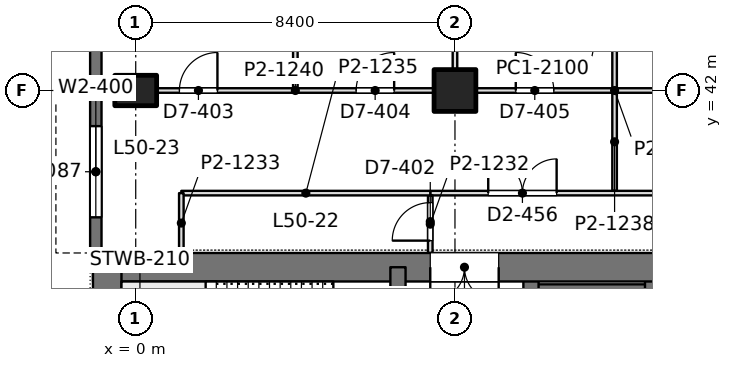
"""IFC4 building model, lengths in metres.
Left out: names, types, materials, properties, quantities, classifications, styles, units other than length and angle.
Written with IfcOpenShell. Run it as: python <this file> out.ifc"""

import sys

from ifc_helpers import new_model, si_unit, direction, frame, frame_2d, origin, origin_2d, place, context, subcontext, project, spatial, rectangle, extrude, element, fill, save


model = new_model("IFC4")
c1 = context("Model", 3, precision=1e-05, world=origin(), true_north=direction((0.0, 1.0)))
c2 = subcontext(c1, "Body", "Model", "MODEL_VIEW")
j1 = project(units=[si_unit("LENGTHUNIT", "METRE"), si_unit("PLANEANGLEUNIT", "RADIAN")], contexts=[c1])
p1 = place(None, origin())
s1 = spatial("IfcSite", under=j1, at=p1, CompositionType="ELEMENT")
p2 = place(p1, origin())
s2 = spatial("IfcBuilding", under=s1, at=p2, CompositionType="ELEMENT")
p3 = place(p2, frame((0.0, 0.0, 219.6)))
s3 = spatial("IfcBuildingStorey", under=s2, at=p3, CompositionType="ELEMENT", Elevation=219.6)
p4 = place(p3, frame((0.0, 42.0, 0.0), z_axis=(0.0, 0.0, 1.0), x_axis=(0.0, 1.0, 0.0)))
e1 = element("IfcColumn", 1, at=p4, inside=s3, PredefinedType="COLUMN", context=c2, shape_type="SweptSolid", body=[
    extrude(rectangle(XDim=0.8, YDim=1.1, at=origin_2d()), origin(), (0.0, 0.0, 1.0), 4.2),
])
p5 = place(p3, frame((8.4, 42.0, 0.0), z_axis=(0.0, 0.0, 1.0), x_axis=(1.0, 0.0, 0.0)))
e2 = element("IfcColumn", 2, at=p5, inside=s3, PredefinedType="COLUMN", context=c2, shape_type="SweptSolid", body=[
    extrude(rectangle(XDim=1.1, YDim=1.1, at=origin_2d()), origin(), (0.0, 0.0, 1.0), 4.2),
])
p6 = place(p3, frame((-1.125, 37.35, 0.0), z_axis=(0.0, 0.0, 1.0), x_axis=(1.0, 0.0, 0.0)))
e3 = element("IfcWall", 3, at=p6, inside=s3, PredefinedType="SHEAR", context=c2, shape_type="SweptSolid", body=[
    extrude(rectangle(XDim=17.85, YDim=0.75, at=frame_2d((8.925, 0.0))), origin(), (0.0, 0.0, 1.0), 4.2),
])
p7 = place(p6, frame((8.875, 0.0, 0.0)))
e4 = element("IfcOpeningElement", 4, at=p7, cuts=e3, PredefinedType="OPENING", context=c2, shape_type="SweptSolid", body=[
    extrude(rectangle(XDim=1.8, YDim=2.4, at=frame_2d((0.9, 1.2))), frame((0.0, 0.385, 0.0), z_axis=(0.0, -1.0, 0.0), x_axis=(1.0, 0.0, 0.0)), (0.0, 0.0, 1.0), 0.77),
])
p8 = place(p3, frame((-0.75, 13.05, 0.0), z_axis=(0.0, 0.0, 1.0), x_axis=(0.0, 1.0, 0.0)))
e5 = element("IfcWall", 5, at=p8, inside=s3, PredefinedType="SHEAR", context=c2, shape_type="SweptSolid", body=[
    extrude(rectangle(XDim=24.3, YDim=0.75, at=frame_2d((12.15, 0.0))), origin(), (0.0, 0.0, 1.0), 4.2),
])
p9 = place(p3, frame((6.9, 13.05, 0.0), z_axis=(0.0, 0.0, 1.0), x_axis=(0.0, 1.0, 0.0)))
e6 = element("IfcWall", 6, at=p9, inside=s3, PredefinedType="SHEAR", context=c2, shape_type="SweptSolid", body=[
    extrude(rectangle(XDim=24.3, YDim=0.4, at=frame_2d((12.15, 0.0))), origin(), (0.0, 0.0, 1.0), 4.2),
])
p10 = place(p9, frame((1.3, 0.0, 0.0)))
e7 = element("IfcOpeningElement", 7, at=p10, cuts=e6, PredefinedType="OPENING", context=c2, shape_type="SweptSolid", body=[
    extrude(rectangle(XDim=1.0, YDim=2.2, at=frame_2d((0.5, 1.1))), frame((0.0, 0.21, 0.0), z_axis=(0.0, -1.0, 0.0), x_axis=(1.0, 0.0, 0.0)), (0.0, 0.0, 1.0), 0.42),
])
p11 = place(p9, frame((22.0, 0.0, 0.0)))
e8 = element("IfcOpeningElement", 8, at=p11, cuts=e6, PredefinedType="OPENING", context=c2, shape_type="SweptSolid", body=[
    extrude(rectangle(XDim=1.0, YDim=2.2, at=frame_2d((0.5, 1.1))), frame((0.0, 0.21, 0.0), z_axis=(0.0, -1.0, 0.0), x_axis=(1.0, 0.0, 0.0)), (0.0, 0.0, 1.0), 0.42),
])
p12 = place(p9, frame((5.55, 0.0, 0.0)))
e9 = element("IfcOpeningElement", 9, at=p12, cuts=e6, PredefinedType="OPENING", context=c2, shape_type="SweptSolid", body=[
    extrude(rectangle(XDim=1.0, YDim=2.2, at=frame_2d((0.5, 1.1))), frame((0.0, 0.21, 0.0), z_axis=(0.0, -1.0, 0.0), x_axis=(1.0, 0.0, 0.0)), (0.0, 0.0, 1.0), 0.42),
])
p13 = place(p9, frame((9.55, 0.0, 0.0)))
e10 = element("IfcOpeningElement", 10, at=p13, cuts=e6, PredefinedType="OPENING", context=c2, shape_type="SweptSolid", body=[
    extrude(rectangle(XDim=1.0, YDim=2.2, at=frame_2d((0.5, 1.1))), frame((0.0, 0.21, 0.0), z_axis=(0.0, -1.0, 0.0), x_axis=(1.0, 0.0, 0.0)), (0.0, 0.0, 1.0), 0.42),
])
p14 = place(p9, frame((12.8, 0.0, 0.0)))
e11 = element("IfcOpeningElement", 11, at=p14, cuts=e6, PredefinedType="OPENING", context=c2, shape_type="SweptSolid", body=[
    extrude(rectangle(XDim=1.1, YDim=2.2, at=frame_2d((0.55, 1.1))), frame((0.0, 0.21, 0.0), z_axis=(0.0, -1.0, 0.0), x_axis=(1.0, 0.0, 0.0)), (0.0, 0.0, 1.0), 0.42),
])
p15 = place(p9, frame((15.538, 0.0, 0.0)))
e12 = element("IfcOpeningElement", 12, at=p15, cuts=e6, PredefinedType="OPENING", context=c2, shape_type="SweptSolid", body=[
    extrude(rectangle(XDim=1.1, YDim=2.2, at=frame_2d((0.55, 1.1))), frame((0.0, 0.21, 0.0), z_axis=(0.0, -1.0, 0.0), x_axis=(1.0, 0.0, 0.0)), (0.0, 0.0, 1.0), 0.42),
])
p16 = place(p9, frame((18.262, 0.0, 0.0)))
e13 = element("IfcOpeningElement", 13, at=p16, cuts=e6, PredefinedType="OPENING", context=c2, shape_type="SweptSolid", body=[
    extrude(rectangle(XDim=1.1, YDim=2.2, at=frame_2d((0.55, 1.1))), frame((0.0, 0.21, 0.0), z_axis=(0.0, -1.0, 0.0), x_axis=(1.0, 0.0, 0.0)), (0.0, 0.0, 1.0), 0.42),
])
p17 = place(p3, frame((10.4, 13.05, 0.0), z_axis=(0.0, 0.0, 1.0), x_axis=(0.0, 1.0, 0.0)))
e14 = element("IfcWall", 14, at=p17, inside=s3, PredefinedType="SHEAR", context=c2, shape_type="SweptSolid", body=[
    extrude(rectangle(XDim=24.3, YDim=0.4, at=frame_2d((12.15, 0.0))), origin(), (0.0, 0.0, 1.0), 4.2),
])
p18 = place(p17, frame((15.75, 0.0, 0.0)))
e15 = element("IfcOpeningElement", 15, at=p18, cuts=e14, PredefinedType="OPENING", context=c2, shape_type="SweptSolid", body=[
    extrude(rectangle(XDim=1.1, YDim=2.2, at=frame_2d((0.55, 1.1))), frame((0.0, 0.21, 0.0), z_axis=(0.0, -1.0, 0.0), x_axis=(1.0, 0.0, 0.0)), (0.0, 0.0, 1.0), 0.42),
])
p19 = place(p17, frame((18.6, 0.0, 0.0)))
e16 = element("IfcOpeningElement", 16, at=p19, cuts=e14, PredefinedType="OPENING", context=c2, shape_type="SweptSolid", body=[
    extrude(rectangle(XDim=1.1, YDim=2.2, at=frame_2d((0.55, 1.1))), frame((0.0, 0.21, 0.0), z_axis=(0.0, -1.0, 0.0), x_axis=(1.0, 0.0, 0.0)), (0.0, 0.0, 1.0), 0.42),
])
p20 = place(p17, frame((21.45, 0.0, 0.0)))
e17 = element("IfcOpeningElement", 17, at=p20, cuts=e14, PredefinedType="OPENING", context=c2, shape_type="SweptSolid", body=[
    extrude(rectangle(XDim=1.1, YDim=2.2, at=frame_2d((0.55, 1.1))), frame((0.0, 0.21, 0.0), z_axis=(0.0, -1.0, 0.0), x_axis=(1.0, 0.0, 0.0)), (0.0, 0.0, 1.0), 0.42),
])
p21 = place(p17, frame((8.65, 0.0, 0.0)))
e18 = element("IfcOpeningElement", 18, at=p21, cuts=e14, PredefinedType="OPENING", context=c2, shape_type="SweptSolid", body=[
    extrude(rectangle(XDim=1.8, YDim=2.4, at=frame_2d((0.9, 1.2))), frame((0.0, 0.21, 0.0), z_axis=(0.0, -1.0, 0.0), x_axis=(1.0, 0.0, 0.0)), (0.0, 0.0, 1.0), 0.42),
])
p22 = place(p3, frame((13.6, 27.925, 0.0), z_axis=(0.0, 0.0, 1.0), x_axis=(0.0, 1.0, 0.0)))
e19 = element("IfcWall", 19, at=p22, inside=s3, PredefinedType="SHEAR", context=c2, shape_type="SweptSolid", body=[
    extrude(rectangle(XDim=9.425, YDim=0.4, at=frame_2d((4.712, 0.0))), origin(), (0.0, 0.0, 1.0), 4.2),
])
p23 = place(p3, frame((10.4, 36.625, 0.0), z_axis=(0.0, 0.0, 1.0), x_axis=(1.0, 0.0, 0.0)))
e20 = element("IfcWall", 20, at=p23, inside=s3, PredefinedType="SHEAR", context=c2, shape_type="SweptSolid", body=[
    extrude(rectangle(XDim=3.2, YDim=0.55, at=frame_2d((1.6, 0.0))), origin(), (0.0, 0.0, 1.0), 4.2),
])
p24 = place(p3, frame((-1.05, 37.725, 0.0), z_axis=(0.0, 0.0, 1.0), x_axis=(0.0, 1.0, 0.0)))
e21 = element("IfcWall", 21, at=p24, inside=s3, PredefinedType="SOLIDWALL", context=c2, shape_type="SweptSolid", body=[
    extrude(rectangle(XDim=4.275, YDim=0.3, at=frame_2d((2.137, 0.0))), origin(), (0.0, 0.0, 1.0), 4.05),
])
p25 = place(p24, frame((0.938, 0.0, 0.9)))
e22 = element("IfcOpeningElement", 22, at=p25, cuts=e21, PredefinedType="OPENING", context=c2, shape_type="SweptSolid", body=[
    extrude(rectangle(XDim=2.4, YDim=1.9, at=frame_2d((1.2, 0.95))), frame((0.0, 0.16, 0.0), z_axis=(0.0, -1.0, 0.0), x_axis=(1.0, 0.0, 0.0)), (0.0, 0.0, 1.0), 0.32),
])
p26 = place(p3, frame((-1.05, 42.0, 0.0), z_axis=(0.0, 0.0, 1.0), x_axis=(0.0, 1.0, 0.0)))
e23 = element("IfcWall", 23, at=p26, inside=s3, PredefinedType="SOLIDWALL", context=c2, shape_type="SweptSolid", body=[
    extrude(rectangle(XDim=2.485, YDim=0.3, at=frame_2d((1.243, 0.0))), origin(), (0.0, 0.0, 1.0), 4.05),
])
p27 = place(p3, frame((0.549, 42.0, 0.0), z_axis=(0.0, 0.0, 1.0), x_axis=(1.0, 0.0, 0.0)))
e24 = element("IfcWall", 24, at=p27, inside=s3, PredefinedType="PARTITIONING", context=c2, shape_type="SweptSolid", body=[
    extrude(rectangle(XDim=7.302, YDim=0.12, at=frame_2d((3.651, 0.0))), origin(), (0.0, 0.0, 1.0), 3.55),
])
p28 = place(p27, frame((0.601, 0.0, 0.0)))
e25 = element("IfcOpeningElement", 25, at=p28, cuts=e24, PredefinedType="OPENING", context=c2, shape_type="SweptSolid", body=[
    extrude(rectangle(XDim=1.0, YDim=2.4, at=frame_2d((0.5, 1.2))), frame((0.0, 0.07, 0.0), z_axis=(0.0, -1.0, 0.0), x_axis=(1.0, 0.0, 0.0)), (0.0, 0.0, 1.0), 0.14),
])
p29 = place(p27, frame((5.251, 0.0, 0.0)))
e26 = element("IfcOpeningElement", 26, at=p29, cuts=e24, PredefinedType="OPENING", context=c2, shape_type="SweptSolid", body=[
    extrude(rectangle(XDim=1.0, YDim=2.4, at=frame_2d((0.5, 1.2))), frame((0.0, 0.07, 0.0), z_axis=(0.0, -1.0, 0.0), x_axis=(1.0, 0.0, 0.0)), (0.0, 0.0, 1.0), 0.14),
])
p30 = place(p3, frame((8.949, 42.0, 0.0), z_axis=(0.0, 0.0, 1.0), x_axis=(1.0, 0.0, 0.0)))
e27 = element("IfcWall", 27, at=p30, inside=s3, PredefinedType="PARTITIONING", context=c2, shape_type="SweptSolid", body=[
    extrude(rectangle(XDim=7.302, YDim=0.12, at=frame_2d((3.651, 0.0))), origin(), (0.0, 0.0, 1.0), 3.55),
])
p31 = place(p30, frame((1.051, 0.0, 0.0)))
e28 = element("IfcOpeningElement", 28, at=p31, cuts=e27, PredefinedType="OPENING", context=c2, shape_type="SweptSolid", body=[
    extrude(rectangle(XDim=1.0, YDim=2.4, at=frame_2d((0.5, 1.2))), frame((0.0, 0.07, 0.0), z_axis=(0.0, -1.0, 0.0), x_axis=(1.0, 0.0, 0.0)), (0.0, 0.0, 1.0), 0.14),
])
p32 = place(p30, frame((5.251, 0.0, 0.0)))
e29 = element("IfcOpeningElement", 29, at=p32, cuts=e27, PredefinedType="OPENING", context=c2, shape_type="SweptSolid", body=[
    extrude(rectangle(XDim=1.0, YDim=2.4, at=frame_2d((0.5, 1.2))), frame((0.0, 0.07, 0.0), z_axis=(0.0, -1.0, 0.0), x_axis=(1.0, 0.0, 0.0)), (0.0, 0.0, 1.0), 0.14),
])
p33 = place(p3, frame((4.2, 42.058, 0.0), z_axis=(0.0, 0.0, 1.0), x_axis=(0.0, 1.0, 0.0)))
e30 = element("IfcWall", 30, at=p33, inside=s3, PredefinedType="PARTITIONING", context=c2, shape_type="SweptSolid", body=[
    extrude(rectangle(XDim=3.644, YDim=0.12, at=frame_2d((1.822, 0.0))), origin(), (0.0, 0.0, 1.0), 3.55),
])
p34 = place(p3, frame((8.4, 42.549, 0.0), z_axis=(0.0, 0.0, 1.0), x_axis=(0.0, 1.0, 0.0)))
e31 = element("IfcWall", 31, at=p34, inside=s3, PredefinedType="PARTITIONING", context=c2, shape_type="SweptSolid", body=[
    extrude(rectangle(XDim=1.702, YDim=0.12, at=frame_2d((0.851, 0.0))), origin(), (0.0, 0.0, 1.0), 3.69),
])
p35 = place(p3, frame((12.6, 42.058, 0.0), z_axis=(0.0, 0.0, 1.0), x_axis=(0.0, 1.0, 0.0)))
e32 = element("IfcWall", 32, at=p35, inside=s3, PredefinedType="PARTITIONING", context=c2, shape_type="SweptSolid", body=[
    extrude(rectangle(XDim=3.644, YDim=0.12, at=frame_2d((1.822, 0.0))), origin(), (0.0, 0.0, 1.0), 3.55),
])
p36 = place(p3, frame((12.6, 39.358, 0.0), z_axis=(0.0, 0.0, 1.0), x_axis=(0.0, 1.0, 0.0)))
e33 = element("IfcWall", 33, at=p36, inside=s3, PredefinedType="PARTITIONING", context=c2, shape_type="SweptSolid", body=[
    extrude(rectangle(XDim=2.584, YDim=0.12, at=frame_2d((1.292, 0.0))), origin(), (0.0, 0.0, 1.0), 3.55),
])
p37 = place(p3, frame((7.748, 39.3, 0.0), z_axis=(0.0, 0.0, 1.0), x_axis=(1.0, 0.0, 0.0)))
e34 = element("IfcWall", 34, at=p37, inside=s3, PredefinedType="PARTITIONING", context=c2, shape_type="SweptSolid", body=[
    extrude(rectangle(XDim=41.452, YDim=0.12, at=frame_2d((20.726, 0.0))), origin(), (0.0, 0.0, 1.0), 3.55),
])
p38 = place(p37, frame((1.527, 0.0, 0.0)))
e35 = element("IfcOpeningElement", 35, at=p38, cuts=e34, PredefinedType="OPENING", context=c2, shape_type="SweptSolid", body=[
    extrude(rectangle(XDim=1.8, YDim=2.2, at=frame_2d((0.9, 1.1))), frame((0.0, 0.07, 0.0), z_axis=(0.0, -1.0, 0.0), x_axis=(1.0, 0.0, 0.0)), (0.0, 0.0, 1.0), 0.14),
])
p39 = place(p37, frame((8.152, 0.0, 0.0)))
e36 = element("IfcOpeningElement", 36, at=p39, cuts=e34, PredefinedType="OPENING", context=c2, shape_type="SweptSolid", body=[
    extrude(rectangle(XDim=1.8, YDim=2.2, at=frame_2d((0.9, 1.1))), frame((0.0, 0.07, 0.0), z_axis=(0.0, -1.0, 0.0), x_axis=(1.0, 0.0, 0.0)), (0.0, 0.0, 1.0), 0.14),
])
p40 = place(p37, frame((12.352, 0.0, 0.0)))
e37 = element("IfcOpeningElement", 37, at=p40, cuts=e34, PredefinedType="OPENING", context=c2, shape_type="SweptSolid", body=[
    extrude(rectangle(XDim=1.8, YDim=2.2, at=frame_2d((0.9, 1.1))), frame((0.0, 0.07, 0.0), z_axis=(0.0, -1.0, 0.0), x_axis=(1.0, 0.0, 0.0)), (0.0, 0.0, 1.0), 0.14),
])
p41 = place(p37, frame((20.752, 0.0, 0.0)))
e38 = element("IfcOpeningElement", 38, at=p41, cuts=e34, PredefinedType="OPENING", context=c2, shape_type="SweptSolid", body=[
    extrude(rectangle(XDim=1.8, YDim=2.2, at=frame_2d((0.9, 1.1))), frame((0.0, 0.07, 0.0), z_axis=(0.0, -1.0, 0.0), x_axis=(1.0, 0.0, 0.0)), (0.0, 0.0, 1.0), 0.14),
])
p42 = place(p37, frame((24.952, 0.0, 0.0)))
e39 = element("IfcOpeningElement", 39, at=p42, cuts=e34, PredefinedType="OPENING", context=c2, shape_type="SweptSolid", body=[
    extrude(rectangle(XDim=1.8, YDim=2.2, at=frame_2d((0.9, 1.1))), frame((0.0, 0.07, 0.0), z_axis=(0.0, -1.0, 0.0), x_axis=(1.0, 0.0, 0.0)), (0.0, 0.0, 1.0), 0.14),
])
p43 = place(p37, frame((32.952, 0.0, 0.0)))
e40 = element("IfcOpeningElement", 40, at=p43, cuts=e34, PredefinedType="OPENING", context=c2, shape_type="SweptSolid", body=[
    extrude(rectangle(XDim=1.8, YDim=2.2, at=frame_2d((0.9, 1.1))), frame((0.0, 0.07, 0.0), z_axis=(0.0, -1.0, 0.0), x_axis=(1.0, 0.0, 0.0)), (0.0, 0.0, 1.0), 0.14),
])
p44 = place(p37, frame((36.752, 0.0, 0.0)))
e41 = element("IfcOpeningElement", 41, at=p44, cuts=e34, PredefinedType="OPENING", context=c2, shape_type="SweptSolid", body=[
    extrude(rectangle(XDim=1.8, YDim=2.2, at=frame_2d((0.9, 1.1))), frame((0.0, 0.07, 0.0), z_axis=(0.0, -1.0, 0.0), x_axis=(1.0, 0.0, 0.0)), (0.0, 0.0, 1.0), 0.14),
])
p45 = place(p3, frame((7.75, 37.724, 0.0), z_axis=(0.0, 0.0, 1.0), x_axis=(0.0, 1.0, 0.0)))
e42 = element("IfcWall", 42, at=p45, inside=s3, PredefinedType="PARTITIONING", context=c2, shape_type="SweptSolid", body=[
    extrude(rectangle(XDim=1.518, YDim=0.12, at=frame_2d((0.759, 0.0))), origin(), (0.0, 0.0, 1.0), 4.05),
])
p46 = place(p45, frame((0.326, 0.0, 0.0)))
e43 = element("IfcOpeningElement", 43, at=p46, cuts=e42, PredefinedType="OPENING", context=c2, shape_type="SweptSolid", body=[
    extrude(rectangle(XDim=1.0, YDim=2.4, at=frame_2d((0.5, 1.2))), frame((0.0, 0.07, 0.0), z_axis=(0.0, -1.0, 0.0), x_axis=(1.0, 0.0, 0.0)), (0.0, 0.0, 1.0), 0.14),
])
p47 = place(p3, frame((1.2, 39.3, 0.0), z_axis=(0.0, 0.0, 1.0), x_axis=(1.0, 0.0, 0.0)))
e44 = element("IfcWall", 44, at=p47, inside=s3, PredefinedType="PARTITIONING", context=c2, shape_type="SweptSolid", body=[
    extrude(rectangle(XDim=6.552, YDim=0.12, at=frame_2d((3.276, 0.0))), origin(), (0.0, 0.0, 1.0), 3.69),
])
p48 = place(p3, frame((1.2, 37.724, 0.0), z_axis=(0.0, 0.0, 1.0), x_axis=(0.0, 1.0, 0.0)))
e45 = element("IfcWall", 45, at=p48, inside=s3, PredefinedType="PARTITIONING", context=c2, shape_type="SweptSolid", body=[
    extrude(rectangle(XDim=1.576, YDim=0.12, at=frame_2d((0.788, 0.0))), origin(), (0.0, 0.0, 1.0), 4.05),
])
p49 = place(p25, origin())
e46 = element("IfcWindow", 46, at=p49, inside=s3, PartitioningType="SINGLE_PANEL", PredefinedType="WINDOW", context=c2, shape_type="SweptSolid", body=[
    extrude(rectangle(XDim=2.4, YDim=1.9, at=frame_2d((1.2, 0.95))), frame((0.0, 0.03, 0.0), z_axis=(0.0, -1.0, 0.0), x_axis=(1.0, 0.0, 0.0)), (0.0, 0.0, 1.0), 0.06),
])
fill(e22, e46)
p50 = place(p7, frame((1.8, 0.0, 0.0), z_axis=(0.0, 0.0, 1.0), x_axis=(-1.0, 0.0, 0.0)))
e47 = element("IfcDoor", 47, at=p50, inside=s3, OperationType="DOUBLE_DOOR_SINGLE_SWING", PredefinedType="DOOR", context=c2, shape_type="SweptSolid", body=[
    extrude(rectangle(XDim=1.8, YDim=2.4, at=frame_2d((0.9, 1.2))), frame((0.0, 0.025, 0.0), z_axis=(0.0, -1.0, 0.0), x_axis=(1.0, 0.0, 0.0)), (0.0, 0.0, 1.0), 0.05),
])
fill(e4, e47)
p51 = place(p28, origin())
e48 = element("IfcDoor", 48, at=p51, inside=s3, OperationType="SINGLE_SWING_RIGHT", PredefinedType="DOOR", context=c2, shape_type="SweptSolid", body=[
    extrude(rectangle(XDim=1.0, YDim=2.4, at=frame_2d((0.5, 1.2))), frame((0.0, 0.025, 0.0), z_axis=(0.0, -1.0, 0.0), x_axis=(1.0, 0.0, 0.0)), (0.0, 0.0, 1.0), 0.05),
])
fill(e25, e48)
p52 = place(p29, origin())
e49 = element("IfcDoor", 49, at=p52, inside=s3, OperationType="SINGLE_SWING_RIGHT", PredefinedType="DOOR", context=c2, shape_type="SweptSolid", body=[
    extrude(rectangle(XDim=1.0, YDim=2.4, at=frame_2d((0.5, 1.2))), frame((0.0, 0.025, 0.0), z_axis=(0.0, -1.0, 0.0), x_axis=(1.0, 0.0, 0.0)), (0.0, 0.0, 1.0), 0.05),
])
fill(e26, e49)
p53 = place(p31, origin())
e50 = element("IfcDoor", 50, at=p53, inside=s3, OperationType="SINGLE_SWING_LEFT", PredefinedType="DOOR", context=c2, shape_type="SweptSolid", body=[
    extrude(rectangle(XDim=1.0, YDim=2.4, at=frame_2d((0.5, 1.2))), frame((0.0, 0.025, 0.0), z_axis=(0.0, -1.0, 0.0), x_axis=(1.0, 0.0, 0.0)), (0.0, 0.0, 1.0), 0.05),
])
fill(e28, e50)
p54 = place(p38, origin())
e51 = element("IfcDoor", 51, at=p54, inside=s3, OperationType="DOUBLE_DOOR_SINGLE_SWING", PredefinedType="DOOR", context=c2, shape_type="SweptSolid", body=[
    extrude(rectangle(XDim=1.8, YDim=2.2, at=frame_2d((0.9, 1.1))), frame((0.0, 0.025, 0.0), z_axis=(0.0, -1.0, 0.0), x_axis=(1.0, 0.0, 0.0)), (0.0, 0.0, 1.0), 0.05),
])
fill(e35, e51)
p55 = place(p46, origin())
e52 = element("IfcDoor", 52, at=p55, inside=s3, OperationType="SINGLE_SWING_LEFT", PredefinedType="DOOR", context=c2, shape_type="SweptSolid", body=[
    extrude(rectangle(XDim=1.0, YDim=2.4, at=frame_2d((0.5, 1.2))), frame((0.0, 0.025, 0.0), z_axis=(0.0, -1.0, 0.0), x_axis=(1.0, 0.0, 0.0)), (0.0, 0.0, 1.0), 0.05),
])
fill(e43, e52)
save(model, sys.argv[1])
